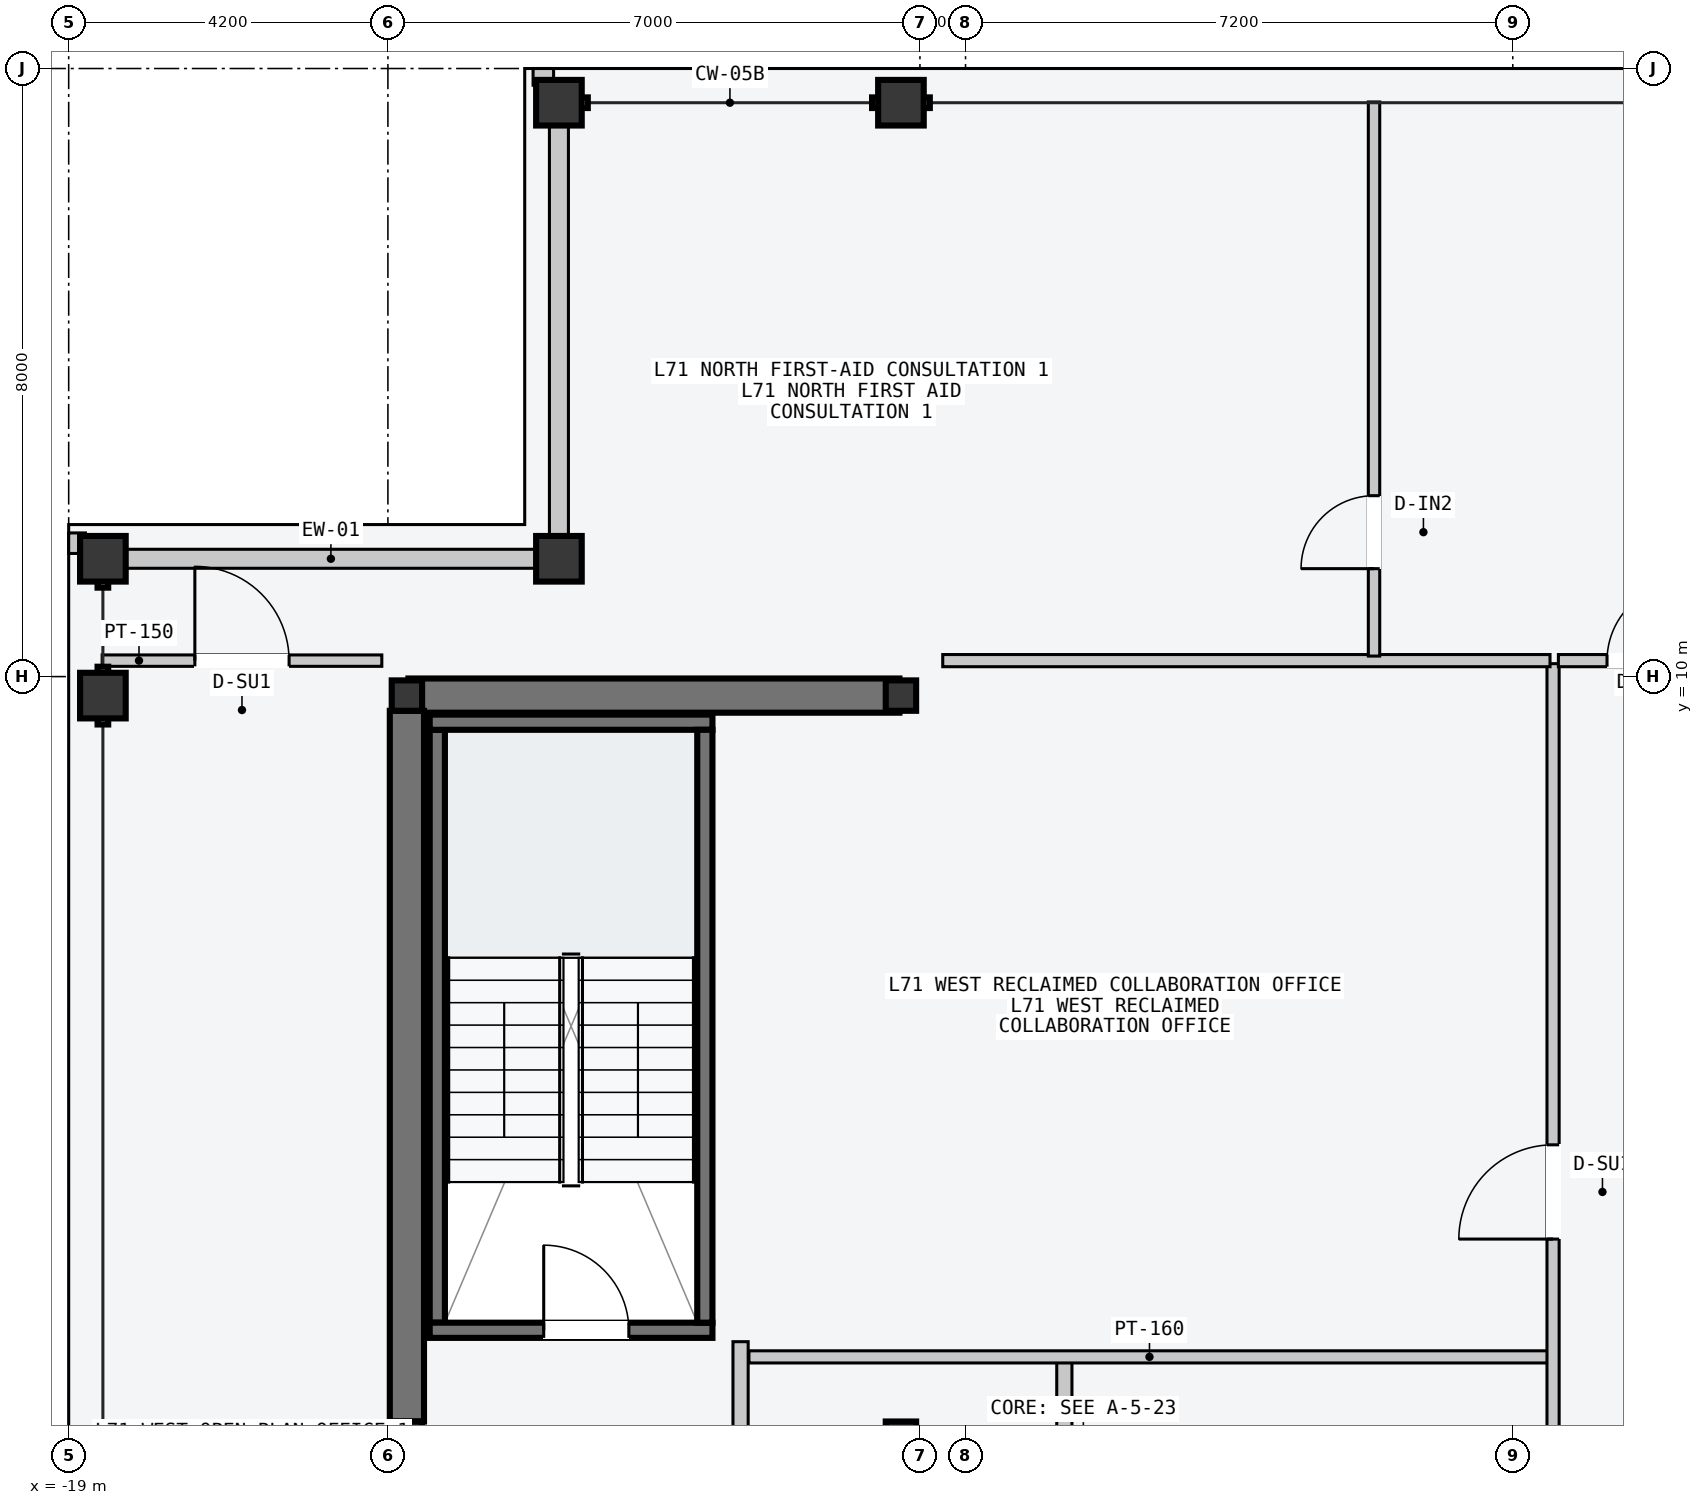
"""IFC4 building model, lengths in metres.
Left out: names, types, materials, properties, quantities, classifications, styles, units other than length and angle.
Written with IfcOpenShell. Run it as: python <this file> out.ifc"""

import sys

from ifc_helpers import new_model, si_unit, direction, frame, frame_2d, origin, origin_2d, place, context, subcontext, project, spatial, rectangle, hollow_rectangle, i_section, extrude, element, fill, save


model = new_model("IFC4")
c1 = context("Model", 3, precision=1e-05, world=origin(), true_north=direction((0.0, 1.0)))
c2 = subcontext(c1, "Body", "Model", "MODEL_VIEW")
j1 = project(units=[si_unit("LENGTHUNIT", "METRE"), si_unit("PLANEANGLEUNIT", "RADIAN")], contexts=[c1])
p1 = place(None, origin())
s1 = spatial("IfcSite", under=j1, at=p1, CompositionType="ELEMENT")
p2 = place(p1, origin())
s2 = spatial("IfcBuilding", under=s1, at=p2, CompositionType="ELEMENT")
p3 = place(p2, frame((0.0, 0.0, 268.8)))
s3 = spatial("IfcBuildingStorey", under=s2, at=p3, CompositionType="ELEMENT", Elevation=268.8)
p4 = place(p3, frame((-14.53, 9.75, -0.2), z_axis=(0.0, 0.0, 1.0), x_axis=(1.0, 0.0, 0.0)))
e1 = element("IfcWall", 1, at=p4, inside=s3, PredefinedType="SHEAR", context=c2, shape_type="SweptSolid", body=[
    extrude(rectangle(XDim=6.46, YDim=0.45, at=frame_2d((3.23, 0.0))), origin(), (0.0, 0.0, 1.0), 3.6),
])
p5 = place(p3, frame((-14.55, 0.2, -0.2), z_axis=(0.0, 0.0, 1.0), x_axis=(0.0, 1.0, 0.0)))
e2 = element("IfcWall", 2, at=p5, inside=s3, PredefinedType="SHEAR", context=c2, shape_type="SweptSolid", body=[
    extrude(rectangle(XDim=9.35, YDim=0.45, at=frame_2d((4.675, 0.0))), origin(), (0.0, 0.0, 1.0), 3.6),
])
p6 = place(p3, frame((-14.15, 1.5, -0.2), z_axis=(0.0, 0.0, 1.0), x_axis=(0.0, 1.0, 0.0)))
e3 = element("IfcWall", 3, at=p6, inside=s3, PredefinedType="SOLIDWALL", context=c2, shape_type="SweptSolid", body=[
    extrude(rectangle(XDim=7.8, YDim=0.2, at=frame_2d((3.9, 0.0))), origin(), (0.0, 0.0, 1.0), 3.6),
])
p7 = place(p3, frame((-14.25, 1.4, -0.2), z_axis=(0.0, 0.0, 1.0), x_axis=(1.0, 0.0, 0.0)))
e4 = element("IfcWall", 4, at=p7, inside=s3, PredefinedType="SOLIDWALL", context=c2, shape_type="SweptSolid", body=[
    extrude(rectangle(XDim=3.72, YDim=0.2, at=frame_2d((1.86, 0.0))), origin(), (0.0, 0.0, 1.0), 3.6),
])
p8 = place(p7, frame((1.5, 0.0, 0.2)))
e5 = element("IfcOpeningElement", 5, at=p8, cuts=e4, PredefinedType="OPENING", context=c2, shape_type="SweptSolid", body=[
    extrude(rectangle(XDim=1.12, YDim=2.18, at=frame_2d((0.56, 1.09))), frame((0.0, 0.11, 0.0), z_axis=(0.0, -1.0, 0.0), x_axis=(1.0, 0.0, 0.0)), (0.0, 0.0, 1.0), 0.22),
])
p9 = place(p3, frame((-14.25, 9.4, -0.2), z_axis=(0.0, 0.0, 1.0), x_axis=(1.0, 0.0, 0.0)))
e6 = element("IfcWall", 6, at=p9, inside=s3, PredefinedType="SOLIDWALL", context=c2, shape_type="SweptSolid", body=[
    extrude(rectangle(XDim=3.72, YDim=0.2, at=frame_2d((1.86, 0.0))), origin(), (0.0, 0.0, 1.0), 3.6),
])
p10 = place(p3, frame((-10.63, 1.5, -0.2), z_axis=(0.0, 0.0, 1.0), x_axis=(0.0, 1.0, 0.0)))
e7 = element("IfcWall", 7, at=p10, inside=s3, PredefinedType="SOLIDWALL", context=c2, shape_type="SweptSolid", body=[
    extrude(rectangle(XDim=7.8, YDim=0.2, at=frame_2d((3.9, 0.0))), origin(), (0.0, 0.0, 1.0), 3.6),
])
for number, where, z_axis, x_axis in (
    (8, (-14.55, 0.0, 0.0), (0.0, 0.0, 1.0), (1.0, 0.0, 0.0)),
    (9, (-14.55, 9.75, 0.0), (0.0, 0.0, 1.0), (1.0, 0.0, 0.0)),
    (10, (-8.05, 0.0, 0.0), (0.0, 0.0, 1.0), (1.0, 0.0, 0.0)),
    (11, (-8.05, 9.75, 0.0), (0.0, 0.0, 1.0), (1.0, 0.0, 0.0)),
):
    element("IfcColumn", number, at=place(p3, frame(where, z_axis=z_axis, x_axis=x_axis)), inside=s3, PredefinedType="COLUMN", context=c2, shape_type="SweptSolid", body=[
        extrude(i_section(OverallWidth=0.4, OverallDepth=0.4, WebThickness=0.013, FlangeThickness=0.021, at=origin_2d()), origin(), (0.0, 0.0, 1.0), 3.6),
    ])
for number, where, z_axis, x_axis in (
    (12, (-12.55, 17.55, 0.0), (0.0, 0.0, 1.0), (1.0, 0.0, 0.0)),
    (13, (-8.05, 17.55, 0.0), (0.0, 0.0, 1.0), (1.0, 0.0, 0.0)),
    (14, (-18.55, 9.75, 0.0), (0.0, 0.0, 1.0), (0.0, 1.0, 0.0)),
    (15, (-18.55, 11.55, 0.0), (0.0, 0.0, 1.0), (0.0, 1.0, 0.0)),
    (16, (-12.55, 11.55, 0.0), (0.0, 0.0, 1.0), (1.0, 0.0, 0.0)),
):
    element("IfcColumn", number, at=place(p3, frame(where, z_axis=z_axis, x_axis=x_axis)), inside=s3, PredefinedType="COLUMN", context=c2, shape_type="SweptSolid", body=[
        extrude(hollow_rectangle(XDim=0.6, YDim=0.6, WallThickness=0.025, at=origin_2d()), origin(), (0.0, 0.0, 1.0), 3.6),
    ])
for number, where, z_axis, x_axis in (
    (17, (-18.24, 11.55, 0.0), (0.0, 0.0, 1.0), (1.0, 0.0, 0.0)),
    (18, (-12.55, 11.86, 0.0), (0.0, 0.0, 1.0), (0.0, 1.0, 0.0)),
):
    element("IfcWall", number, at=place(p3, frame(where, z_axis=z_axis, x_axis=x_axis)), inside=s3, PredefinedType="STANDARD", context=c2, shape_type="SweptSolid", body=[
        extrude(rectangle(XDim=5.38, YDim=0.25, at=frame_2d((2.69, 0.0))), origin(), (0.0, 0.0, 1.0), 2.85),
    ])
for number, where, z_axis, x_axis in (
    (19, (-12.89, 17.89, 0.0), (0.0, 0.0, 1.0), (1.0, 0.0, 0.0)),
    (20, (-18.89, 11.62, 0.0), (0.0, 0.0, 1.0), (0.0, 1.0, 0.0)),
):
    element("IfcWall", number, at=place(p3, frame(where, z_axis=z_axis, x_axis=x_axis)), inside=s3, PredefinedType="PARAPET", context=c2, shape_type="SweptSolid", body=[
        extrude(rectangle(XDim=0.27, YDim=0.22, at=frame_2d((0.135, 0.0))), origin(), (0.0, 0.0, 1.0), 1.2),
    ])
p11 = place(p3, frame((-5.9, -9.45, 0.0), z_axis=(0.0, 0.0, 1.0), x_axis=(0.0, 1.0, 0.0)))
e21 = element("IfcWall", 21, at=p11, inside=s3, PredefinedType="PARTITIONING", context=c2, shape_type="SweptSolid", body=[
    extrude(rectangle(XDim=10.5, YDim=0.2, at=frame_2d((5.25, 0.0))), origin(), (0.0, 0.0, 1.0), 3.4),
])
p12 = place(p11, frame((3.9, 0.0, 0.0)))
e22 = element("IfcOpeningElement", 22, at=p12, cuts=e21, PredefinedType="OPENING", context=c2, shape_type="SweptSolid", body=[
    extrude(rectangle(XDim=1.5, YDim=2.2, at=frame_2d((0.75, 1.1))), frame((0.0, 0.11, 0.0), z_axis=(0.0, -1.0, 0.0), x_axis=(1.0, 0.0, 0.0)), (0.0, 0.0, 1.0), 0.22),
])
p13 = place(p3, frame((-10.16, -2.55, 0.0), z_axis=(0.0, 0.0, 1.0), x_axis=(0.0, 1.0, 0.0)))
e23 = element("IfcWall", 23, at=p13, inside=s3, PredefinedType="PARTITIONING", context=c2, shape_type="SweptSolid", body=[
    extrude(rectangle(XDim=3.8, YDim=0.2, at=frame_2d((1.9, 0.0))), origin(), (0.0, 0.0, 1.0), 3.4),
])
p14 = place(p13, frame((1.3, 0.0, 0.0)))
e24 = element("IfcOpeningElement", 24, at=p14, cuts=e23, PredefinedType="OPENING", context=c2, shape_type="SweptSolid", body=[
    extrude(rectangle(XDim=1.1, YDim=2.15, at=frame_2d((0.55, 1.075))), frame((0.0, 0.11, 0.0), z_axis=(0.0, -1.0, 0.0), x_axis=(1.0, 0.0, 0.0)), (0.0, 0.0, 1.0), 0.22),
])
p15 = place(p3, frame((-10.05, 1.05, 0.0), z_axis=(0.0, 0.0, 1.0), x_axis=(1.0, 0.0, 0.0)))
e25 = element("IfcWall", 25, at=p15, inside=s3, PredefinedType="PARTITIONING", context=c2, shape_type="SweptSolid", body=[
    extrude(rectangle(XDim=10.54, YDim=0.16, at=frame_2d((5.27, 0.0))), origin(), (0.0, 0.0, 1.0), 3.4),
])
p16 = place(p3, frame((0.53, -3.5, 0.0), z_axis=(0.0, 0.0, 1.0), x_axis=(0.0, 1.0, 0.0)))
e26 = element("IfcWall", 26, at=p16, inside=s3, PredefinedType="PARTITIONING", context=c2, shape_type="SweptSolid", body=[
    extrude(rectangle(XDim=13.67, YDim=0.16, at=frame_2d((6.835, 0.0))), origin(), (0.0, 0.0, 1.0), 3.4),
])
p17 = place(p16, frame((6.1, 0.0, 0.0)))
e27 = element("IfcOpeningElement", 27, at=p17, cuts=e26, PredefinedType="OPENING", context=c2, shape_type="SweptSolid", body=[
    extrude(rectangle(XDim=1.24, YDim=2.24, at=frame_2d((0.62, 1.12))), frame((0.0, 0.09, 0.0), z_axis=(0.0, -1.0, 0.0), x_axis=(1.0, 0.0, 0.0)), (0.0, 0.0, 1.0), 0.18),
])
p18 = place(p16, frame((1.6, 0.0, 0.0)))
e28 = element("IfcOpeningElement", 28, at=p18, cuts=e26, PredefinedType="OPENING", context=c2, shape_type="SweptSolid", body=[
    extrude(rectangle(XDim=0.96, YDim=2.18, at=frame_2d((0.48, 1.09))), frame((0.0, 0.09, 0.0), z_axis=(0.0, -1.0, 0.0), x_axis=(1.0, 0.0, 0.0)), (0.0, 0.0, 1.0), 0.18),
])
p19 = place(p3, frame((-7.5, 10.21, 0.0), z_axis=(0.0, 0.0, 1.0), x_axis=(1.0, 0.0, 0.0)))
e29 = element("IfcWall", 29, at=p19, inside=s3, PredefinedType="PARTITIONING", context=c2, shape_type="SweptSolid", body=[
    extrude(rectangle(XDim=7.99, YDim=0.16, at=frame_2d((3.995, 0.0))), origin(), (0.0, 0.0, 1.0), 3.4),
])
p20 = place(p3, frame((-1.826, 10.27, 0.0), z_axis=(0.0, 0.0, 1.0), x_axis=(0.0, 1.0, 0.0)))
e30 = element("IfcWall", 30, at=p20, inside=s3, PredefinedType="PARTITIONING", context=c2, shape_type="SweptSolid", body=[
    extrude(rectangle(XDim=7.29, YDim=0.15, at=frame_2d((3.645, 0.0))), origin(), (0.0, 0.0, 1.0), 3.4),
])
p21 = place(p20, frame((1.15, 0.0, 0.0)))
e31 = element("IfcOpeningElement", 31, at=p21, cuts=e30, PredefinedType="OPENING", context=c2, shape_type="SweptSolid", body=[
    extrude(rectangle(XDim=0.96, YDim=2.18, at=frame_2d((0.48, 1.09))), frame((0.0, 0.085, 0.0), z_axis=(0.0, -1.0, 0.0), x_axis=(1.0, 0.0, 0.0)), (0.0, 0.0, 1.0), 0.17),
])
p22 = place(p3, frame((0.6, 10.21, 0.0), z_axis=(0.0, 0.0, 1.0), x_axis=(1.0, 0.0, 0.0)))
e32 = element("IfcWall", 32, at=p22, inside=s3, PredefinedType="PARTITIONING", context=c2, shape_type="SweptSolid", body=[
    extrude(rectangle(XDim=2.3, YDim=0.16, at=frame_2d((1.15, 0.0))), origin(), (0.0, 0.0, 1.0), 3.4),
])
p23 = place(p22, frame((0.64, 0.0, 0.0)))
e33 = element("IfcOpeningElement", 33, at=p23, cuts=e32, PredefinedType="OPENING", context=c2, shape_type="SweptSolid", body=[
    extrude(rectangle(XDim=1.02, YDim=2.2, at=frame_2d((0.51, 1.1))), frame((0.0, 0.09, 0.0), z_axis=(0.0, -1.0, 0.0), x_axis=(1.0, 0.0, 0.0)), (0.0, 0.0, 1.0), 0.18),
])
p24 = place(p3, frame((-18.56, 10.21, 0.0), z_axis=(0.0, 0.0, 1.0), x_axis=(1.0, 0.0, 0.0)))
e34 = element("IfcWall", 34, at=p24, inside=s3, PredefinedType="PARTITIONING", context=c2, shape_type="SweptSolid", body=[
    extrude(rectangle(XDim=3.68, YDim=0.15, at=frame_2d((1.84, 0.0))), origin(), (0.0, 0.0, 1.0), 3.4),
])
p25 = place(p24, frame((1.22, 0.0, 0.0)))
e35 = element("IfcOpeningElement", 35, at=p25, cuts=e34, PredefinedType="OPENING", context=c2, shape_type="SweptSolid", body=[
    extrude(rectangle(XDim=1.24, YDim=2.24, at=frame_2d((0.62, 1.12))), frame((0.0, 0.085, 0.0), z_axis=(0.0, -1.0, 0.0), x_axis=(1.0, 0.0, 0.0)), (0.0, 0.0, 1.0), 0.17),
])
p26 = place(p8, origin())
e36 = element("IfcDoor", 36, at=p26, inside=s3, OperationType="SINGLE_SWING_LEFT", PredefinedType="DOOR", context=c2, shape_type="SweptSolid", body=[
    extrude(rectangle(XDim=1.12, YDim=2.18, at=frame_2d((0.56, 1.09))), frame((0.0, 0.025, 0.0), z_axis=(0.0, -1.0, 0.0), x_axis=(1.0, 0.0, 0.0)), (0.0, 0.0, 1.0), 0.05),
])
fill(e5, e36)
p27 = place(p17, origin())
e37 = element("IfcDoor", 37, at=p27, inside=s3, OperationType="SINGLE_SWING_LEFT", PredefinedType="DOOR", context=c2, shape_type="SweptSolid", body=[
    extrude(rectangle(XDim=1.24, YDim=2.24, at=frame_2d((0.62, 1.12))), frame((0.0, 0.025, 0.0), z_axis=(0.0, -1.0, 0.0), x_axis=(1.0, 0.0, 0.0)), (0.0, 0.0, 1.0), 0.05),
])
fill(e27, e37)
p28 = place(p21, origin())
e38 = element("IfcDoor", 38, at=p28, inside=s3, OperationType="SINGLE_SWING_LEFT", PredefinedType="DOOR", context=c2, shape_type="SweptSolid", body=[
    extrude(rectangle(XDim=0.96, YDim=2.18, at=frame_2d((0.48, 1.09))), frame((0.0, 0.025, 0.0), z_axis=(0.0, -1.0, 0.0), x_axis=(1.0, 0.0, 0.0)), (0.0, 0.0, 1.0), 0.05),
])
fill(e31, e38)
p29 = place(p23, origin())
e39 = element("IfcDoor", 39, at=p29, inside=s3, OperationType="SINGLE_SWING_RIGHT", PredefinedType="DOOR", context=c2, shape_type="SweptSolid", body=[
    extrude(rectangle(XDim=1.02, YDim=2.2, at=frame_2d((0.51, 1.1))), frame((0.0, 0.025, 0.0), z_axis=(0.0, -1.0, 0.0), x_axis=(1.0, 0.0, 0.0)), (0.0, 0.0, 1.0), 0.05),
])
fill(e33, e39)
p30 = place(p25, origin())
e40 = element("IfcDoor", 40, at=p30, inside=s3, OperationType="SINGLE_SWING_LEFT", PredefinedType="DOOR", context=c2, shape_type="SweptSolid", body=[
    extrude(rectangle(XDim=1.24, YDim=2.24, at=frame_2d((0.62, 1.12))), frame((0.0, 0.025, 0.0), z_axis=(0.0, -1.0, 0.0), x_axis=(1.0, 0.0, 0.0)), (0.0, 0.0, 1.0), 0.05),
])
fill(e35, e40)
save(model, sys.argv[1])
